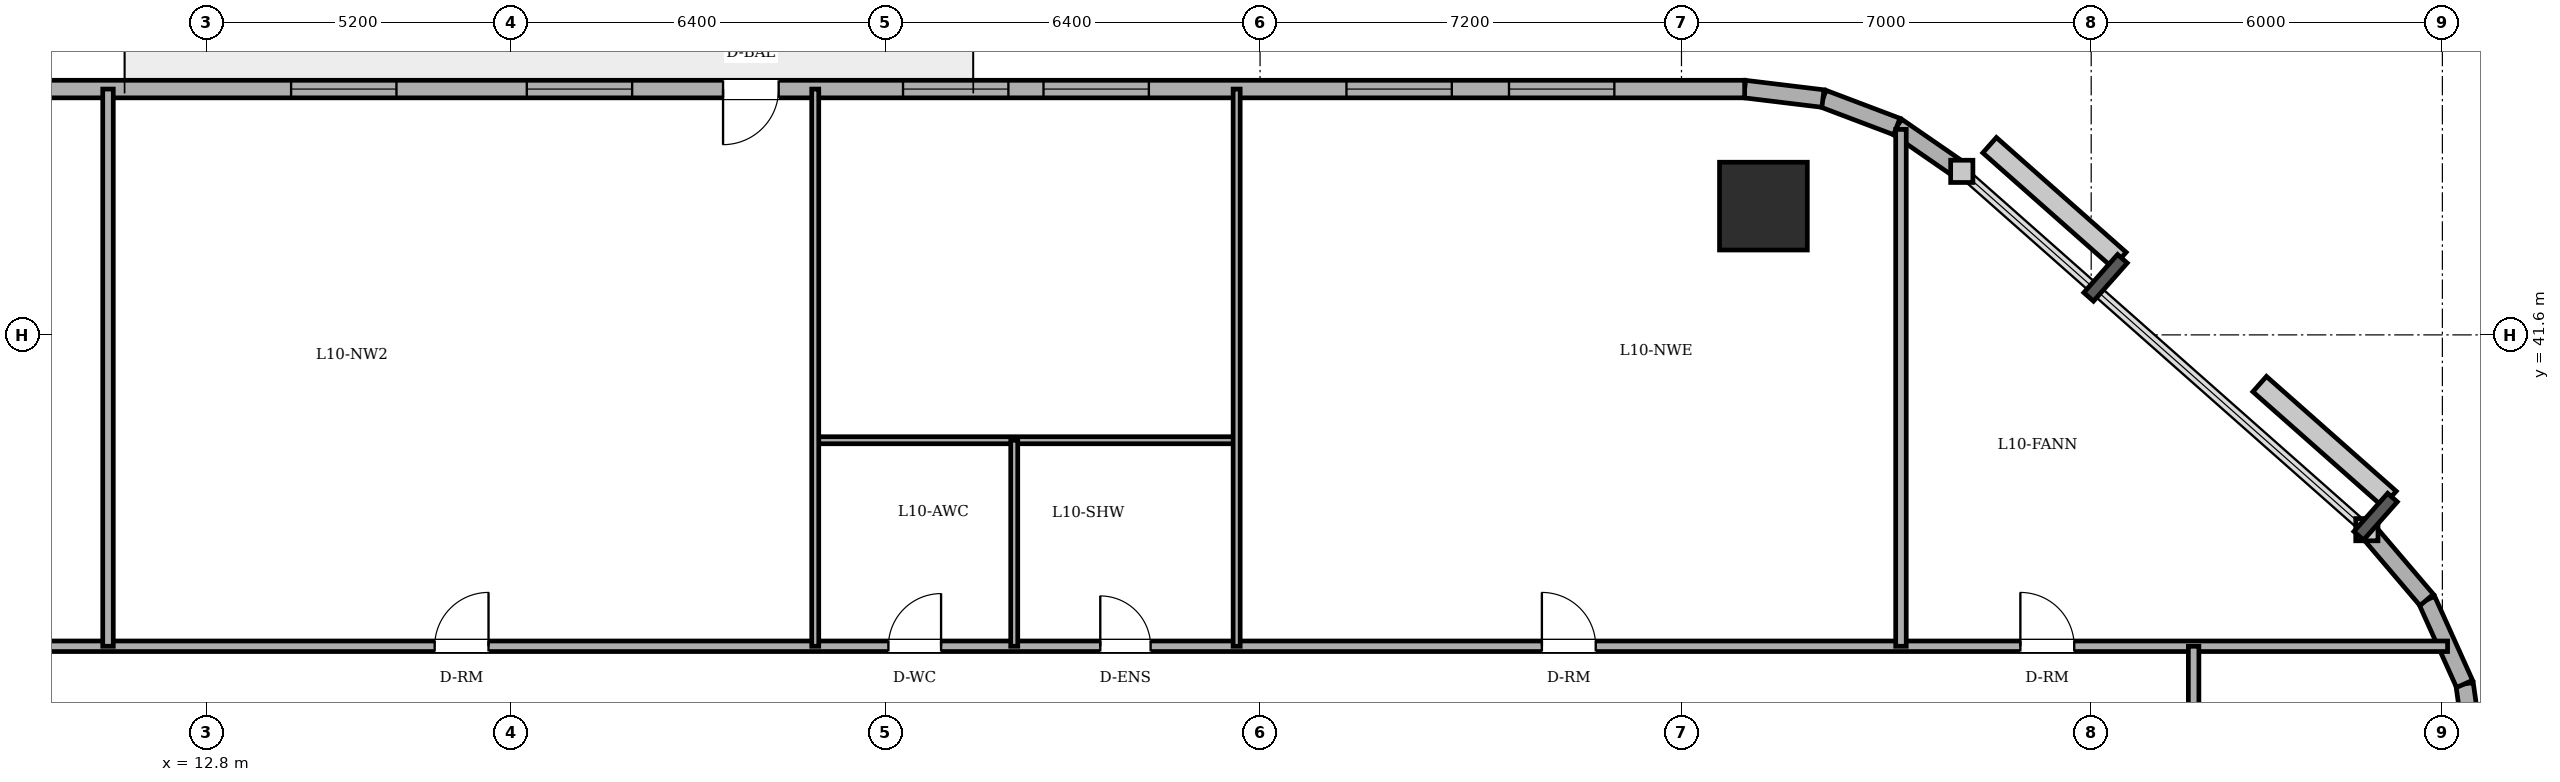
"""IFC4 building model, lengths in metres.
Left out: names, types, materials, properties, quantities, classifications, styles, units other than length and angle.
Written with IfcOpenShell. Run it as: python <this file> out.ifc"""

import sys

from ifc_helpers import new_model, si_unit, direction, frame, frame_2d, origin, origin_2d, place, context, subcontext, project, spatial, rectangle, circle, extrude, element, fill, save


model = new_model("IFC4")
c1 = context("Model", 3, precision=1e-05, world=origin(), true_north=direction((0.0, 1.0)))
c2 = subcontext(c1, "Body", "Model", "MODEL_VIEW")
j1 = project(units=[si_unit("LENGTHUNIT", "METRE"), si_unit("PLANEANGLEUNIT", "RADIAN")], contexts=[c1])
p1 = place(None, origin())
s1 = spatial("IfcSite", under=j1, at=p1, CompositionType="ELEMENT")
p2 = place(p1, origin())
s2 = spatial("IfcBuilding", under=s1, at=p2, CompositionType="ELEMENT")
p3 = place(p2, frame((0.0, 0.0, 39.6)))
s3 = spatial("IfcBuildingStorey", under=s2, at=p3, CompositionType="ELEMENT", Elevation=39.6)
p4 = place(p3, frame((39.4, 43.8, 0.0), z_axis=(0.0, 0.0, 1.0), x_axis=(1.0, 0.0, 0.0)))
e1 = element("IfcColumn", 1, at=p4, inside=s3, PredefinedType="COLUMN", context=c2, shape_type="SweptSolid", body=[
    extrude(circle(Radius=0.75, at=origin_2d()), origin(), (0.0, 0.0, 1.0), 3.6),
])
p5 = place(p3, frame((51.6, 34.077, 0.0), z_axis=(0.0, 0.0, 1.0), x_axis=(-0.140380048512, 0.990097693149, 0.0)))
e2 = element("IfcWall", 2, at=p5, inside=s3, PredefinedType="SOLIDWALL", context=c2, shape_type="SweptSolid", body=[
    extrude(rectangle(XDim=1.576, YDim=0.3, at=frame_2d((0.788, 0.0))), origin(), (0.0, 0.0, 1.0), 3.4),
])
p6 = place(p3, frame((51.379, 35.637, 0.0), z_axis=(0.0, 0.0, 1.0), x_axis=(-0.410996558744, 0.911636895206, 0.0)))
e3 = element("IfcWall", 3, at=p6, inside=s3, PredefinedType="SOLIDWALL", context=c2, shape_type="SweptSolid", body=[
    extrude(rectangle(XDim=1.574, YDim=0.3, at=frame_2d((0.787, 0.0))), origin(), (0.0, 0.0, 1.0), 3.4),
])
p7 = place(p3, frame((50.732, 37.072, 0.0), z_axis=(0.0, 0.0, 1.0), x_axis=(-0.648389989909, 0.7613083613, 0.0)))
e4 = element("IfcWall", 4, at=p7, inside=s3, PredefinedType="SOLIDWALL", context=c2, shape_type="SweptSolid", body=[
    extrude(rectangle(XDim=1.576, YDim=0.3, at=frame_2d((0.788, 0.0))), origin(), (0.0, 0.0, 1.0), 3.4),
])
p8 = place(p3, frame((42.789, 44.394, 0.0), z_axis=(0.0, 0.0, 1.0), x_axis=(-0.823116500192, 0.567872544777, 0.0)))
e5 = element("IfcWall", 5, at=p8, inside=s3, PredefinedType="SOLIDWALL", context=c2, shape_type="SweptSolid", body=[
    extrude(rectangle(XDim=1.349, YDim=0.3, at=frame_2d((0.674, 0.0))), origin(), (0.0, 0.0, 1.0), 3.4),
])
p9 = place(p3, frame((41.679, 45.16, 0.0), z_axis=(0.0, 0.0, 1.0), x_axis=(-0.935156721165, 0.354234254216, 0.0)))
e6 = element("IfcWall", 6, at=p9, inside=s3, PredefinedType="SOLIDWALL", context=c2, shape_type="SweptSolid", body=[
    extrude(rectangle(XDim=1.349, YDim=0.3, at=frame_2d((0.675, 0.0))), origin(), (0.0, 0.0, 1.0), 3.4),
])
p10 = place(p3, frame((40.417, 45.638, 0.0), z_axis=(0.0, 0.0, 1.0), x_axis=(-0.992739027259, 0.120288086515, 0.0)))
e7 = element("IfcWall", 7, at=p10, inside=s3, PredefinedType="SOLIDWALL", context=c2, shape_type="SweptSolid", body=[
    extrude(rectangle(XDim=1.348, YDim=0.3, at=frame_2d((0.674, 0.0))), origin(), (0.0, 0.0, 1.0), 3.4),
])
p11 = place(p3, frame((39.079, 45.8, 0.0), z_axis=(0.0, 0.0, 1.0), x_axis=(-1.0, 0.0, 0.0)))
e8 = element("IfcWall", 8, at=p11, inside=s3, PredefinedType="SOLIDWALL", context=c2, shape_type="SweptSolid", body=[
    extrude(rectangle(XDim=30.079, YDim=0.3, at=frame_2d((15.04, 0.0))), origin(), (0.0, 0.0, 1.0), 3.4),
])
p12 = place(p11, frame((16.504, 0.0, 0.0)))
e9 = element("IfcOpeningElement", 9, at=p12, cuts=e8, PredefinedType="OPENING", context=c2, shape_type="SweptSolid", body=[
    extrude(rectangle(XDim=0.95, YDim=2.2, at=frame_2d((0.475, 1.1))), frame((0.0, 0.16, 0.0), z_axis=(0.0, -1.0, 0.0), x_axis=(1.0, 0.0, 0.0)), (0.0, 0.0, 1.0), 0.32),
])
p13 = place(p11, frame((2.226, 0.0, 0.85)))
e10 = element("IfcOpeningElement", 10, at=p13, cuts=e8, PredefinedType="OPENING", context=c2, shape_type="SweptSolid", body=[
    extrude(rectangle(XDim=1.8, YDim=1.55, at=frame_2d((0.9, 0.775))), frame((0.0, 0.16, 0.0), z_axis=(0.0, -1.0, 0.0), x_axis=(1.0, 0.0, 0.0)), (0.0, 0.0, 1.0), 0.32),
])
p14 = place(p11, frame((5.003, 0.0, 0.85)))
e11 = element("IfcOpeningElement", 11, at=p14, cuts=e8, PredefinedType="OPENING", context=c2, shape_type="SweptSolid", body=[
    extrude(rectangle(XDim=1.8, YDim=1.55, at=frame_2d((0.9, 0.775))), frame((0.0, 0.16, 0.0), z_axis=(0.0, -1.0, 0.0), x_axis=(1.0, 0.0, 0.0)), (0.0, 0.0, 1.0), 0.32),
])
p15 = place(p11, frame((10.179, 0.0, 0.85)))
e12 = element("IfcOpeningElement", 12, at=p15, cuts=e8, PredefinedType="OPENING", context=c2, shape_type="SweptSolid", body=[
    extrude(rectangle(XDim=1.8, YDim=1.55, at=frame_2d((0.9, 0.775))), frame((0.0, 0.16, 0.0), z_axis=(0.0, -1.0, 0.0), x_axis=(1.0, 0.0, 0.0)), (0.0, 0.0, 1.0), 0.32),
])
p16 = place(p11, frame((12.579, 0.0, 0.85)))
e13 = element("IfcOpeningElement", 13, at=p16, cuts=e8, PredefinedType="OPENING", context=c2, shape_type="SweptSolid", body=[
    extrude(rectangle(XDim=1.8, YDim=1.55, at=frame_2d((0.9, 0.775))), frame((0.0, 0.16, 0.0), z_axis=(0.0, -1.0, 0.0), x_axis=(1.0, 0.0, 0.0)), (0.0, 0.0, 1.0), 0.32),
])
p17 = place(p11, frame((19.007, 0.0, 0.85)))
e14 = element("IfcOpeningElement", 14, at=p17, cuts=e8, PredefinedType="OPENING", context=c2, shape_type="SweptSolid", body=[
    extrude(rectangle(XDim=1.8, YDim=1.55, at=frame_2d((0.9, 0.775))), frame((0.0, 0.16, 0.0), z_axis=(0.0, -1.0, 0.0), x_axis=(1.0, 0.0, 0.0)), (0.0, 0.0, 1.0), 0.32),
])
p18 = place(p11, frame((23.034, 0.0, 0.85)))
e15 = element("IfcOpeningElement", 15, at=p18, cuts=e8, PredefinedType="OPENING", context=c2, shape_type="SweptSolid", body=[
    extrude(rectangle(XDim=1.8, YDim=1.55, at=frame_2d((0.9, 0.775))), frame((0.0, 0.16, 0.0), z_axis=(0.0, -1.0, 0.0), x_axis=(1.0, 0.0, 0.0)), (0.0, 0.0, 1.0), 0.32),
])
p19 = place(p3, frame((3.4, 36.28, 0.0), z_axis=(0.0, 0.0, 1.0), x_axis=(1.0, 0.0, 0.0)))
e16 = element("IfcWall", 16, at=p19, inside=s3, PredefinedType="PARTITIONING", context=c2, shape_type="SweptSolid", body=[
    extrude(rectangle(XDim=47.689, YDim=0.18, at=frame_2d((23.845, 0.0))), origin(), (0.0, 0.0, 1.0), 3.4),
])
p20 = place(p19, frame((21.05, 0.0, 0.0)))
e17 = element("IfcOpeningElement", 17, at=p20, cuts=e16, PredefinedType="OPENING", context=c2, shape_type="SweptSolid", body=[
    extrude(rectangle(XDim=0.9, YDim=2.1, at=frame_2d((0.45, 1.05))), frame((0.0, 0.1, 0.0), z_axis=(0.0, -1.0, 0.0), x_axis=(1.0, 0.0, 0.0)), (0.0, 0.0, 1.0), 0.2),
])
p21 = place(p19, frame((24.67, 0.0, 0.0)))
e18 = element("IfcOpeningElement", 18, at=p21, cuts=e16, PredefinedType="OPENING", context=c2, shape_type="SweptSolid", body=[
    extrude(rectangle(XDim=0.86, YDim=2.1, at=frame_2d((0.43, 1.05))), frame((0.0, 0.1, 0.0), z_axis=(0.0, -1.0, 0.0), x_axis=(1.0, 0.0, 0.0)), (0.0, 0.0, 1.0), 0.2),
])
p22 = place(p19, frame((40.39, 0.0, 0.0)))
e19 = element("IfcOpeningElement", 19, at=p22, cuts=e16, PredefinedType="OPENING", context=c2, shape_type="SweptSolid", body=[
    extrude(rectangle(XDim=0.92, YDim=2.1, at=frame_2d((0.46, 1.05))), frame((0.0, 0.1, 0.0), z_axis=(0.0, -1.0, 0.0), x_axis=(1.0, 0.0, 0.0)), (0.0, 0.0, 1.0), 0.2),
])
p23 = place(p19, frame((4.699, 0.0, 0.0)))
e20 = element("IfcOpeningElement", 20, at=p23, cuts=e16, PredefinedType="OPENING", context=c2, shape_type="SweptSolid", body=[
    extrude(rectangle(XDim=0.92, YDim=2.1, at=frame_2d((0.46, 1.05))), frame((0.0, 0.1, 0.0), z_axis=(0.0, -1.0, 0.0), x_axis=(1.0, 0.0, 0.0)), (0.0, 0.0, 1.0), 0.2),
])
p24 = place(p19, frame((13.298, 0.0, 0.0)))
e21 = element("IfcOpeningElement", 21, at=p24, cuts=e16, PredefinedType="OPENING", context=c2, shape_type="SweptSolid", body=[
    extrude(rectangle(XDim=0.92, YDim=2.1, at=frame_2d((0.46, 1.05))), frame((0.0, 0.1, 0.0), z_axis=(0.0, -1.0, 0.0), x_axis=(1.0, 0.0, 0.0)), (0.0, 0.0, 1.0), 0.2),
])
p25 = place(p19, frame((32.215, 0.0, 0.0)))
e22 = element("IfcOpeningElement", 22, at=p25, cuts=e16, PredefinedType="OPENING", context=c2, shape_type="SweptSolid", body=[
    extrude(rectangle(XDim=0.92, YDim=2.1, at=frame_2d((0.46, 1.05))), frame((0.0, 0.1, 0.0), z_axis=(0.0, -1.0, 0.0), x_axis=(1.0, 0.0, 0.0)), (0.0, 0.0, 1.0), 0.2),
])
p26 = place(p3, frame((23.2, 39.8, 0.0), z_axis=(0.0, 0.0, 1.0), x_axis=(1.0, 0.0, 0.0)))
e23 = element("IfcWall", 23, at=p26, inside=s3, PredefinedType="PARTITIONING", context=c2, shape_type="SweptSolid", body=[
    extrude(rectangle(XDim=7.2, YDim=0.12, at=frame_2d((3.6, 0.0))), origin(), (0.0, 0.0, 1.0), 3.4),
])
p27 = place(p3, frame((11.117, 36.28, 0.0), z_axis=(0.0, 0.0, 1.0), x_axis=(0.0, 1.0, 0.0)))
e24 = element("IfcWall", 24, at=p27, inside=s3, PredefinedType="PARTITIONING", context=c2, shape_type="SweptSolid", body=[
    extrude(rectangle(XDim=9.52, YDim=0.18, at=frame_2d((4.76, 0.0))), origin(), (0.0, 0.0, 1.0), 3.4),
])
p28 = place(p3, frame((23.2, 36.28, 0.0), z_axis=(0.0, 0.0, 1.0), x_axis=(0.0, 1.0, 0.0)))
e25 = element("IfcWall", 25, at=p28, inside=s3, PredefinedType="PARTITIONING", context=c2, shape_type="SweptSolid", body=[
    extrude(rectangle(XDim=9.52, YDim=0.12, at=frame_2d((4.76, 0.0))), origin(), (0.0, 0.0, 1.0), 3.4),
])
p29 = place(p3, frame((26.6, 36.28, 0.0), z_axis=(0.0, 0.0, 1.0), x_axis=(0.0, 1.0, 0.0)))
e26 = element("IfcWall", 26, at=p29, inside=s3, PredefinedType="PARTITIONING", context=c2, shape_type="SweptSolid", body=[
    extrude(rectangle(XDim=3.52, YDim=0.12, at=frame_2d((1.76, 0.0))), origin(), (0.0, 0.0, 1.0), 3.4),
])
p30 = place(p3, frame((30.4, 36.28, 0.0), z_axis=(0.0, 0.0, 1.0), x_axis=(0.0, 1.0, 0.0)))
e27 = element("IfcWall", 27, at=p30, inside=s3, PredefinedType="PARTITIONING", context=c2, shape_type="SweptSolid", body=[
    extrude(rectangle(XDim=9.52, YDim=0.12, at=frame_2d((4.76, 0.0))), origin(), (0.0, 0.0, 1.0), 3.4),
])
p31 = place(p3, frame((41.75, 36.28, 0.0), z_axis=(0.0, 0.0, 1.0), x_axis=(0.0, 1.0, 0.0)))
e28 = element("IfcWall", 28, at=p31, inside=s3, PredefinedType="PARTITIONING", context=c2, shape_type="SweptSolid", body=[
    extrude(rectangle(XDim=8.831, YDim=0.18, at=frame_2d((4.416, 0.0))), origin(), (0.0, 0.0, 1.0), 2.782),
])
p32 = place(p3, frame((46.75, 33.82, 0.0), z_axis=(0.0, 0.0, 1.0), x_axis=(0.0, 1.0, 0.0)))
e29 = element("IfcWall", 29, at=p32, inside=s3, PredefinedType="PARTITIONING", context=c2, shape_type="SweptSolid", body=[
    extrude(rectangle(XDim=2.46, YDim=0.18, at=frame_2d((1.23, 0.0))), origin(), (0.0, 0.0, 1.0), 3.4),
])
p33 = place(p12, origin())
e30 = element("IfcDoor", 30, at=p33, inside=s3, OperationType="SINGLE_SWING_RIGHT", PredefinedType="DOOR", context=c2, shape_type="SweptSolid", body=[
    extrude(rectangle(XDim=0.95, YDim=2.2, at=frame_2d((0.475, 1.1))), frame((0.0, 0.025, 0.0), z_axis=(0.0, -1.0, 0.0), x_axis=(1.0, 0.0, 0.0)), (0.0, 0.0, 1.0), 0.05),
])
fill(e9, e30)
p34 = place(p13, origin())
e31 = element("IfcWindow", 31, at=p34, inside=s3, PartitioningType="DOUBLE_PANEL_VERTICAL", PredefinedType="WINDOW", context=c2, shape_type="SweptSolid", body=[
    extrude(rectangle(XDim=1.8, YDim=1.55, at=frame_2d((0.9, 0.775))), frame((0.0, 0.03, 0.0), z_axis=(0.0, -1.0, 0.0), x_axis=(1.0, 0.0, 0.0)), (0.0, 0.0, 1.0), 0.06),
])
fill(e10, e31)
p35 = place(p14, origin())
e32 = element("IfcWindow", 32, at=p35, inside=s3, PartitioningType="DOUBLE_PANEL_VERTICAL", PredefinedType="WINDOW", context=c2, shape_type="SweptSolid", body=[
    extrude(rectangle(XDim=1.8, YDim=1.55, at=frame_2d((0.9, 0.775))), frame((0.0, 0.03, 0.0), z_axis=(0.0, -1.0, 0.0), x_axis=(1.0, 0.0, 0.0)), (0.0, 0.0, 1.0), 0.06),
])
fill(e11, e32)
p36 = place(p15, origin())
e33 = element("IfcWindow", 33, at=p36, inside=s3, PartitioningType="DOUBLE_PANEL_VERTICAL", PredefinedType="WINDOW", context=c2, shape_type="SweptSolid", body=[
    extrude(rectangle(XDim=1.8, YDim=1.55, at=frame_2d((0.9, 0.775))), frame((0.0, 0.03, 0.0), z_axis=(0.0, -1.0, 0.0), x_axis=(1.0, 0.0, 0.0)), (0.0, 0.0, 1.0), 0.06),
])
fill(e12, e33)
p37 = place(p16, origin())
e34 = element("IfcWindow", 34, at=p37, inside=s3, PartitioningType="DOUBLE_PANEL_VERTICAL", PredefinedType="WINDOW", context=c2, shape_type="SweptSolid", body=[
    extrude(rectangle(XDim=1.8, YDim=1.55, at=frame_2d((0.9, 0.775))), frame((0.0, 0.03, 0.0), z_axis=(0.0, -1.0, 0.0), x_axis=(1.0, 0.0, 0.0)), (0.0, 0.0, 1.0), 0.06),
])
fill(e13, e34)
p38 = place(p17, origin())
e35 = element("IfcWindow", 35, at=p38, inside=s3, PartitioningType="DOUBLE_PANEL_VERTICAL", PredefinedType="WINDOW", context=c2, shape_type="SweptSolid", body=[
    extrude(rectangle(XDim=1.8, YDim=1.55, at=frame_2d((0.9, 0.775))), frame((0.0, 0.03, 0.0), z_axis=(0.0, -1.0, 0.0), x_axis=(1.0, 0.0, 0.0)), (0.0, 0.0, 1.0), 0.06),
])
fill(e14, e35)
p39 = place(p18, origin())
e36 = element("IfcWindow", 36, at=p39, inside=s3, PartitioningType="DOUBLE_PANEL_VERTICAL", PredefinedType="WINDOW", context=c2, shape_type="SweptSolid", body=[
    extrude(rectangle(XDim=1.8, YDim=1.55, at=frame_2d((0.9, 0.775))), frame((0.0, 0.03, 0.0), z_axis=(0.0, -1.0, 0.0), x_axis=(1.0, 0.0, 0.0)), (0.0, 0.0, 1.0), 0.06),
])
fill(e15, e36)
p40 = place(p20, origin())
e37 = element("IfcDoor", 37, at=p40, inside=s3, OperationType="SINGLE_SWING_RIGHT", PredefinedType="DOOR", context=c2, shape_type="SweptSolid", body=[
    extrude(rectangle(XDim=0.9, YDim=2.1, at=frame_2d((0.45, 1.05))), frame((0.0, 0.025, 0.0), z_axis=(0.0, -1.0, 0.0), x_axis=(1.0, 0.0, 0.0)), (0.0, 0.0, 1.0), 0.05),
])
fill(e17, e37)
p41 = place(p21, origin())
e38 = element("IfcDoor", 38, at=p41, inside=s3, OperationType="SINGLE_SWING_LEFT", PredefinedType="DOOR", context=c2, shape_type="SweptSolid", body=[
    extrude(rectangle(XDim=0.86, YDim=2.1, at=frame_2d((0.43, 1.05))), frame((0.0, 0.025, 0.0), z_axis=(0.0, -1.0, 0.0), x_axis=(1.0, 0.0, 0.0)), (0.0, 0.0, 1.0), 0.05),
])
fill(e18, e38)
p42 = place(p22, origin())
e39 = element("IfcDoor", 39, at=p42, inside=s3, OperationType="SINGLE_SWING_LEFT", PredefinedType="DOOR", context=c2, shape_type="SweptSolid", body=[
    extrude(rectangle(XDim=0.92, YDim=2.1, at=frame_2d((0.46, 1.05))), frame((0.0, 0.025, 0.0), z_axis=(0.0, -1.0, 0.0), x_axis=(1.0, 0.0, 0.0)), (0.0, 0.0, 1.0), 0.05),
])
fill(e19, e39)
p43 = place(p24, origin())
e40 = element("IfcDoor", 40, at=p43, inside=s3, OperationType="SINGLE_SWING_RIGHT", PredefinedType="DOOR", context=c2, shape_type="SweptSolid", body=[
    extrude(rectangle(XDim=0.92, YDim=2.1, at=frame_2d((0.46, 1.05))), frame((0.0, 0.025, 0.0), z_axis=(0.0, -1.0, 0.0), x_axis=(1.0, 0.0, 0.0)), (0.0, 0.0, 1.0), 0.05),
])
fill(e21, e40)
p44 = place(p25, origin())
e41 = element("IfcDoor", 41, at=p44, inside=s3, OperationType="SINGLE_SWING_LEFT", PredefinedType="DOOR", context=c2, shape_type="SweptSolid", body=[
    extrude(rectangle(XDim=0.92, YDim=2.1, at=frame_2d((0.46, 1.05))), frame((0.0, 0.025, 0.0), z_axis=(0.0, -1.0, 0.0), x_axis=(1.0, 0.0, 0.0)), (0.0, 0.0, 1.0), 0.05),
])
fill(e22, e41)
save(model, sys.argv[1])
